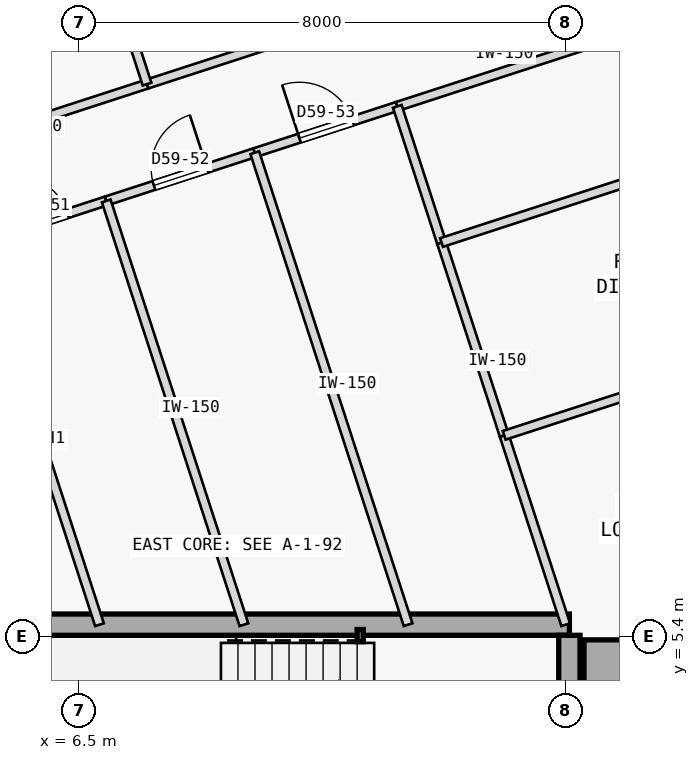
"""IFC4 building model, lengths in metres.
Left out: names, types, materials, properties, quantities, classifications, styles, units other than length and angle.
Written with IfcOpenShell. Run it as: python <this file> out.ifc"""

import sys

from ifc_helpers import new_model, si_unit, direction, frame, frame_2d, origin, origin_2d, place, context, subcontext, project, spatial, rectangle, hollow_rectangle, extrude, element, fill, save


model = new_model("IFC4")
c1 = context("Model", 3, precision=1e-05, world=origin(), true_north=direction((0.0, 1.0)))
c2 = subcontext(c1, "Body", "Model", "MODEL_VIEW")
j1 = project(units=[si_unit("LENGTHUNIT", "METRE"), si_unit("PLANEANGLEUNIT", "RADIAN")], contexts=[c1])
p1 = place(None, origin())
s1 = spatial("IfcSite", under=j1, at=p1, CompositionType="ELEMENT")
p2 = place(p1, origin())
s2 = spatial("IfcBuilding", under=s1, at=p2, CompositionType="ELEMENT")
p3 = place(p2, frame((0.0, 0.0, 224.3)))
s3 = spatial("IfcBuildingStorey", under=s2, at=p3, CompositionType="ELEMENT", Elevation=224.3)
p4 = place(p3, frame((15.25, 4.9, 0.0), z_axis=(0.0, 0.0, 1.0), x_axis=(1.0, 0.0, 0.0)))
e1 = element("IfcColumn", 1, at=p4, inside=s3, PredefinedType="COLUMN", context=c2, shape_type="SweptSolid", body=[
    extrude(rectangle(XDim=0.9, YDim=0.9, at=origin_2d()), origin(), (0.0, 0.0, 1.0), 3.35),
])
p5 = place(p3, frame((3.15, 5.6, 0.0), z_axis=(0.0, 0.0, 1.0), x_axis=(1.0, 0.0, 0.0)))
e2 = element("IfcWall", 2, at=p5, inside=s3, PredefinedType="SHEAR", context=c2, shape_type="SweptSolid", body=[
    extrude(rectangle(XDim=11.41, YDim=0.35, at=frame_2d((5.705, 0.0))), origin(), (0.0, 0.0, 1.0), 3.125),
])
p6 = place(p3, frame((14.56, -5.425, 0.0), z_axis=(0.0, 0.0, 1.0), x_axis=(0.0, 1.0, 0.0)))
e3 = element("IfcWall", 3, at=p6, inside=s3, PredefinedType="SHEAR", context=c2, shape_type="SweptSolid", body=[
    extrude(rectangle(XDim=10.85, YDim=0.35, at=frame_2d((5.425, 0.0))), origin(), (0.0, 0.0, 1.0), 3.125),
])
p7 = place(p3, frame((11.12, 5.42, 0.0), z_axis=(0.0, 0.0, 1.0), x_axis=(1.0, 0.0, 0.0)))
e4 = element("IfcColumn", 4, at=p7, inside=s3, PredefinedType="COLUMN", context=c2, shape_type="SweptSolid", body=[
    extrude(hollow_rectangle(XDim=0.1, YDim=0.2, WallThickness=0.008, at=origin_2d()), origin(), (0.0, 0.0, 1.0), 3.35),
])
p8 = place(p3, frame((3.314, 13.092, 0.0), z_axis=(0.0, 0.0, 1.0), x_axis=(0.951068976929, 0.308978641858, 0.0)))
e5 = element("IfcWall", 5, at=p8, inside=s3, PredefinedType="PARTITIONING", context=c2, shape_type="SweptSolid", body=[
    extrude(rectangle(XDim=4.522, YDim=0.15, at=frame_2d((2.261, 0.0))), origin(), (0.0, 0.0, 1.0), 3.125),
])
p9 = place(p8, frame((1.786, 0.0, 0.0)))
e6 = element("IfcOpeningElement", 6, at=p9, cuts=e5, PredefinedType="OPENING", context=c2, shape_type="SweptSolid", body=[
    extrude(rectangle(XDim=0.95, YDim=2.15, at=frame_2d((0.475, 1.075))), frame((0.0, 0.085, 0.0), z_axis=(0.0, -1.0, 0.0), x_axis=(1.0, 0.0, 0.0)), (0.0, 0.0, 1.0), 0.17),
])
p10 = place(p3, frame((7.615, 14.489, 0.0), z_axis=(0.0, 0.0, 1.0), x_axis=(0.951050780541, 0.309034646652, 0.0)))
e7 = element("IfcWall", 7, at=p10, inside=s3, PredefinedType="PARTITIONING", context=c2, shape_type="SweptSolid", body=[
    extrude(rectangle(XDim=3.65, YDim=0.15, at=frame_2d((1.825, 0.0))), origin(), (0.0, 0.0, 1.0), 3.125),
])
p11 = place(p3, frame((4.795, 11.87, 0.0), z_axis=(0.0, 0.0, 1.0), x_axis=(0.951065832698, 0.308988319964, 0.0)))
e8 = element("IfcWall", 8, at=p11, inside=s3, PredefinedType="PARTITIONING", context=c2, shape_type="SweptSolid", body=[
    extrude(rectangle(XDim=2.259, YDim=0.15, at=frame_2d((1.129, 0.0))), origin(), (0.0, 0.0, 1.0), 3.125),
])
p12 = place(p11, frame((0.669, 0.0, 0.0)))
e9 = element("IfcOpeningElement", 9, at=p12, cuts=e8, PredefinedType="OPENING", context=c2, shape_type="SweptSolid", body=[
    extrude(rectangle(XDim=0.92, YDim=2.15, at=frame_2d((0.46, 1.075))), frame((0.0, 0.085, 0.0), z_axis=(0.0, -1.0, 0.0), x_axis=(1.0, 0.0, 0.0)), (0.0, 0.0, 1.0), 0.17),
])
p13 = place(p3, frame((6.944, 12.568, 0.0), z_axis=(0.0, 0.0, 1.0), x_axis=(0.951042451835, 0.309060276981, 0.0)))
e10 = element("IfcWall", 10, at=p13, inside=s3, PredefinedType="PARTITIONING", context=c2, shape_type="SweptSolid", body=[
    extrude(rectangle(XDim=2.568, YDim=0.15, at=frame_2d((1.284, 0.0))), origin(), (0.0, 0.0, 1.0), 3.125),
])
p14 = place(p13, frame((0.824, 0.0, 0.0)))
e11 = element("IfcOpeningElement", 11, at=p14, cuts=e10, PredefinedType="OPENING", context=c2, shape_type="SweptSolid", body=[
    extrude(rectangle(XDim=0.92, YDim=2.15, at=frame_2d((0.46, 1.075))), frame((0.0, 0.085, 0.0), z_axis=(0.0, -1.0, 0.0), x_axis=(1.0, 0.0, 0.0)), (0.0, 0.0, 1.0), 0.17),
])
p15 = place(p3, frame((9.386, 13.362, 0.0), z_axis=(0.0, 0.0, 1.0), x_axis=(0.951052991774, 0.309027841526, 0.0)))
e12 = element("IfcWall", 12, at=p15, inside=s3, PredefinedType="PARTITIONING", context=c2, shape_type="SweptSolid", body=[
    extrude(rectangle(XDim=2.465, YDim=0.15, at=frame_2d((1.232, 0.0))), origin(), (0.0, 0.0, 1.0), 3.125),
])
p16 = place(p15, frame((0.772, 0.0, 0.0)))
e13 = element("IfcOpeningElement", 13, at=p16, cuts=e12, PredefinedType="OPENING", context=c2, shape_type="SweptSolid", body=[
    extrude(rectangle(XDim=0.92, YDim=2.15, at=frame_2d((0.46, 1.075))), frame((0.0, 0.085, 0.0), z_axis=(0.0, -1.0, 0.0), x_axis=(1.0, 0.0, 0.0)), (0.0, 0.0, 1.0), 0.17),
])
p17 = place(p3, frame((11.73, 14.123, 0.0), z_axis=(0.0, 0.0, 1.0), x_axis=(0.951060263663, 0.309005460926, 0.0)))
e14 = element("IfcWall", 14, at=p17, inside=s3, PredefinedType="PARTITIONING", context=c2, shape_type="SweptSolid", body=[
    extrude(rectangle(XDim=12.327, YDim=0.15, at=frame_2d((6.164, 0.0))), origin(), (0.0, 0.0, 1.0), 3.125),
])
p18 = place(p17, frame((5.704, 0.0, 0.0)))
e15 = element("IfcOpeningElement", 15, at=p18, cuts=e14, PredefinedType="OPENING", context=c2, shape_type="SweptSolid", body=[
    extrude(rectangle(XDim=0.92, YDim=2.15, at=frame_2d((0.46, 1.075))), frame((0.0, 0.085, 0.0), z_axis=(0.0, -1.0, 0.0), x_axis=(1.0, 0.0, 0.0)), (0.0, 0.0, 1.0), 0.17),
])
p19 = place(p3, frame((7.615, 14.489, 0.0), z_axis=(0.0, 0.0, 1.0), x_axis=(-0.309029230739, 0.951052540372, 0.0)))
e16 = element("IfcWall", 16, at=p19, inside=s3, PredefinedType="PARTITIONING", context=c2, shape_type="SweptSolid", body=[
    extrude(rectangle(XDim=7.284, YDim=0.15, at=frame_2d((3.642, 0.0))), origin(), (0.0, 0.0, 1.0), 3.125),
])
p20 = place(p3, frame((6.833, 5.6, 0.0), z_axis=(0.0, 0.0, 1.0), x_axis=(-0.309019923183, 0.951055564663, 0.0)))
e17 = element("IfcWall", 17, at=p20, inside=s3, PredefinedType="PARTITIONING", context=c2, shape_type="SweptSolid", body=[
    extrude(rectangle(XDim=6.593, YDim=0.15, at=frame_2d((3.296, 0.0))), origin(), (0.0, 0.0, 1.0), 2.675),
])
p21 = place(p3, frame((9.208, 5.6, 0.0), z_axis=(0.0, 0.0, 1.0), x_axis=(-0.309021275068, 0.951055125403, 0.0)))
e18 = element("IfcWall", 18, at=p21, inside=s3, PredefinedType="PARTITIONING", context=c2, shape_type="SweptSolid", body=[
    extrude(rectangle(XDim=7.327, YDim=0.15, at=frame_2d((3.664, 0.0))), origin(), (0.0, 0.0, 1.0), 3.125),
])
p22 = place(p3, frame((11.908, 5.6, 0.0), z_axis=(0.0, 0.0, 1.0), x_axis=(-0.308994076163, 0.951063962568, 0.0)))
e19 = element("IfcWall", 19, at=p22, inside=s3, PredefinedType="PARTITIONING", context=c2, shape_type="SweptSolid", body=[
    extrude(rectangle(XDim=8.161, YDim=0.15, at=frame_2d((4.081, 0.0))), origin(), (0.0, 0.0, 1.0), 3.125),
])
p23 = place(p3, frame((14.5, 5.6, 0.0), z_axis=(0.0, 0.0, 1.0), x_axis=(-0.309015253813, 0.951057081836, 0.0)))
e20 = element("IfcWall", 20, at=p23, inside=s3, PredefinedType="PARTITIONING", context=c2, shape_type="SweptSolid", body=[
    extrude(rectangle(XDim=3.274, YDim=0.15, at=frame_2d((1.637, 0.0))), origin(), (0.0, 0.0, 1.0), 3.125),
])
p24 = place(p3, frame((13.488, 8.714, 0.0), z_axis=(0.0, 0.0, 1.0), x_axis=(-0.308946982245, 0.951079261766, 0.0)))
e21 = element("IfcWall", 21, at=p24, inside=s3, PredefinedType="PARTITIONING", context=c2, shape_type="SweptSolid", body=[
    extrude(rectangle(XDim=3.334, YDim=0.15, at=frame_2d((1.667, 0.0))), origin(), (0.0, 0.0, 1.0), 3.125),
])
p25 = place(p3, frame((12.458, 11.885, 0.0), z_axis=(0.0, 0.0, 1.0), x_axis=(-0.309062621189, 0.951041690035, 0.0)))
e22 = element("IfcWall", 22, at=p25, inside=s3, PredefinedType="PARTITIONING", context=c2, shape_type="SweptSolid", body=[
    extrude(rectangle(XDim=2.354, YDim=0.15, at=frame_2d((1.177, 0.0))), origin(), (0.0, 0.0, 1.0), 3.125),
])
p26 = place(p3, frame((14.821, 4.61, 0.0), z_axis=(0.0, 0.0, 1.0), x_axis=(0.951063700751, 0.30899488202, 0.0)))
e23 = element("IfcWall", 23, at=p26, inside=s3, PredefinedType="PARTITIONING", context=c2, shape_type="SweptSolid", body=[
    extrude(rectangle(XDim=10.352, YDim=0.15, at=frame_2d((5.176, 0.0))), origin(), (0.0, 0.0, 1.0), 3.125),
])
p27 = place(p26, frame((4.716, 0.0, 0.0)))
e24 = element("IfcOpeningElement", 24, at=p27, cuts=e23, PredefinedType="OPENING", context=c2, shape_type="SweptSolid", body=[
    extrude(rectangle(XDim=0.92, YDim=2.15, at=frame_2d((0.46, 1.075))), frame((0.0, 0.085, 0.0), z_axis=(0.0, -1.0, 0.0), x_axis=(1.0, 0.0, 0.0)), (0.0, 0.0, 1.0), 0.17),
])
p28 = place(p3, frame((13.488, 8.714, 0.0), z_axis=(0.0, 0.0, 1.0), x_axis=(0.951062154725, 0.308999640533, 0.0)))
e25 = element("IfcWall", 25, at=p28, inside=s3, PredefinedType="PARTITIONING", context=c2, shape_type="SweptSolid", body=[
    extrude(rectangle(XDim=12.327, YDim=0.15, at=frame_2d((6.164, 0.0))), origin(), (0.0, 0.0, 1.0), 3.125),
])
p29 = place(p28, frame((5.704, 0.0, 0.0)))
e26 = element("IfcOpeningElement", 26, at=p29, cuts=e25, PredefinedType="OPENING", context=c2, shape_type="SweptSolid", body=[
    extrude(rectangle(XDim=0.92, YDim=2.15, at=frame_2d((0.46, 1.075))), frame((0.0, 0.085, 0.0), z_axis=(0.0, -1.0, 0.0), x_axis=(1.0, 0.0, 0.0)), (0.0, 0.0, 1.0), 0.17),
])
p30 = place(p3, frame((12.458, 11.885, 0.0), z_axis=(0.0, 0.0, 1.0), x_axis=(0.951060263663, 0.309005460926, 0.0)))
e27 = element("IfcWall", 27, at=p30, inside=s3, PredefinedType="PARTITIONING", context=c2, shape_type="SweptSolid", body=[
    extrude(rectangle(XDim=12.327, YDim=0.15, at=frame_2d((6.164, 0.0))), origin(), (0.0, 0.0, 1.0), 3.125),
])
p31 = place(p12, origin())
e28 = element("IfcDoor", 28, at=p31, inside=s3, OperationType="SINGLE_SWING_LEFT", PredefinedType="DOOR", context=c2, shape_type="SweptSolid", body=[
    extrude(rectangle(XDim=0.92, YDim=2.15, at=frame_2d((0.46, 1.075))), frame((0.0, 0.025, 0.0), z_axis=(0.0, -1.0, 0.0), x_axis=(1.0, 0.0, 0.0)), (0.0, 0.0, 1.0), 0.05),
])
fill(e9, e28)
p32 = place(p14, origin())
e29 = element("IfcDoor", 29, at=p32, inside=s3, OperationType="SINGLE_SWING_RIGHT", PredefinedType="DOOR", context=c2, shape_type="SweptSolid", body=[
    extrude(rectangle(XDim=0.92, YDim=2.15, at=frame_2d((0.46, 1.075))), frame((0.0, 0.025, 0.0), z_axis=(0.0, -1.0, 0.0), x_axis=(1.0, 0.0, 0.0)), (0.0, 0.0, 1.0), 0.05),
])
fill(e11, e29)
p33 = place(p16, origin())
e30 = element("IfcDoor", 30, at=p33, inside=s3, OperationType="SINGLE_SWING_LEFT", PredefinedType="DOOR", context=c2, shape_type="SweptSolid", body=[
    extrude(rectangle(XDim=0.92, YDim=2.15, at=frame_2d((0.46, 1.075))), frame((0.0, 0.025, 0.0), z_axis=(0.0, -1.0, 0.0), x_axis=(1.0, 0.0, 0.0)), (0.0, 0.0, 1.0), 0.05),
])
fill(e13, e30)
save(model, sys.argv[1])
